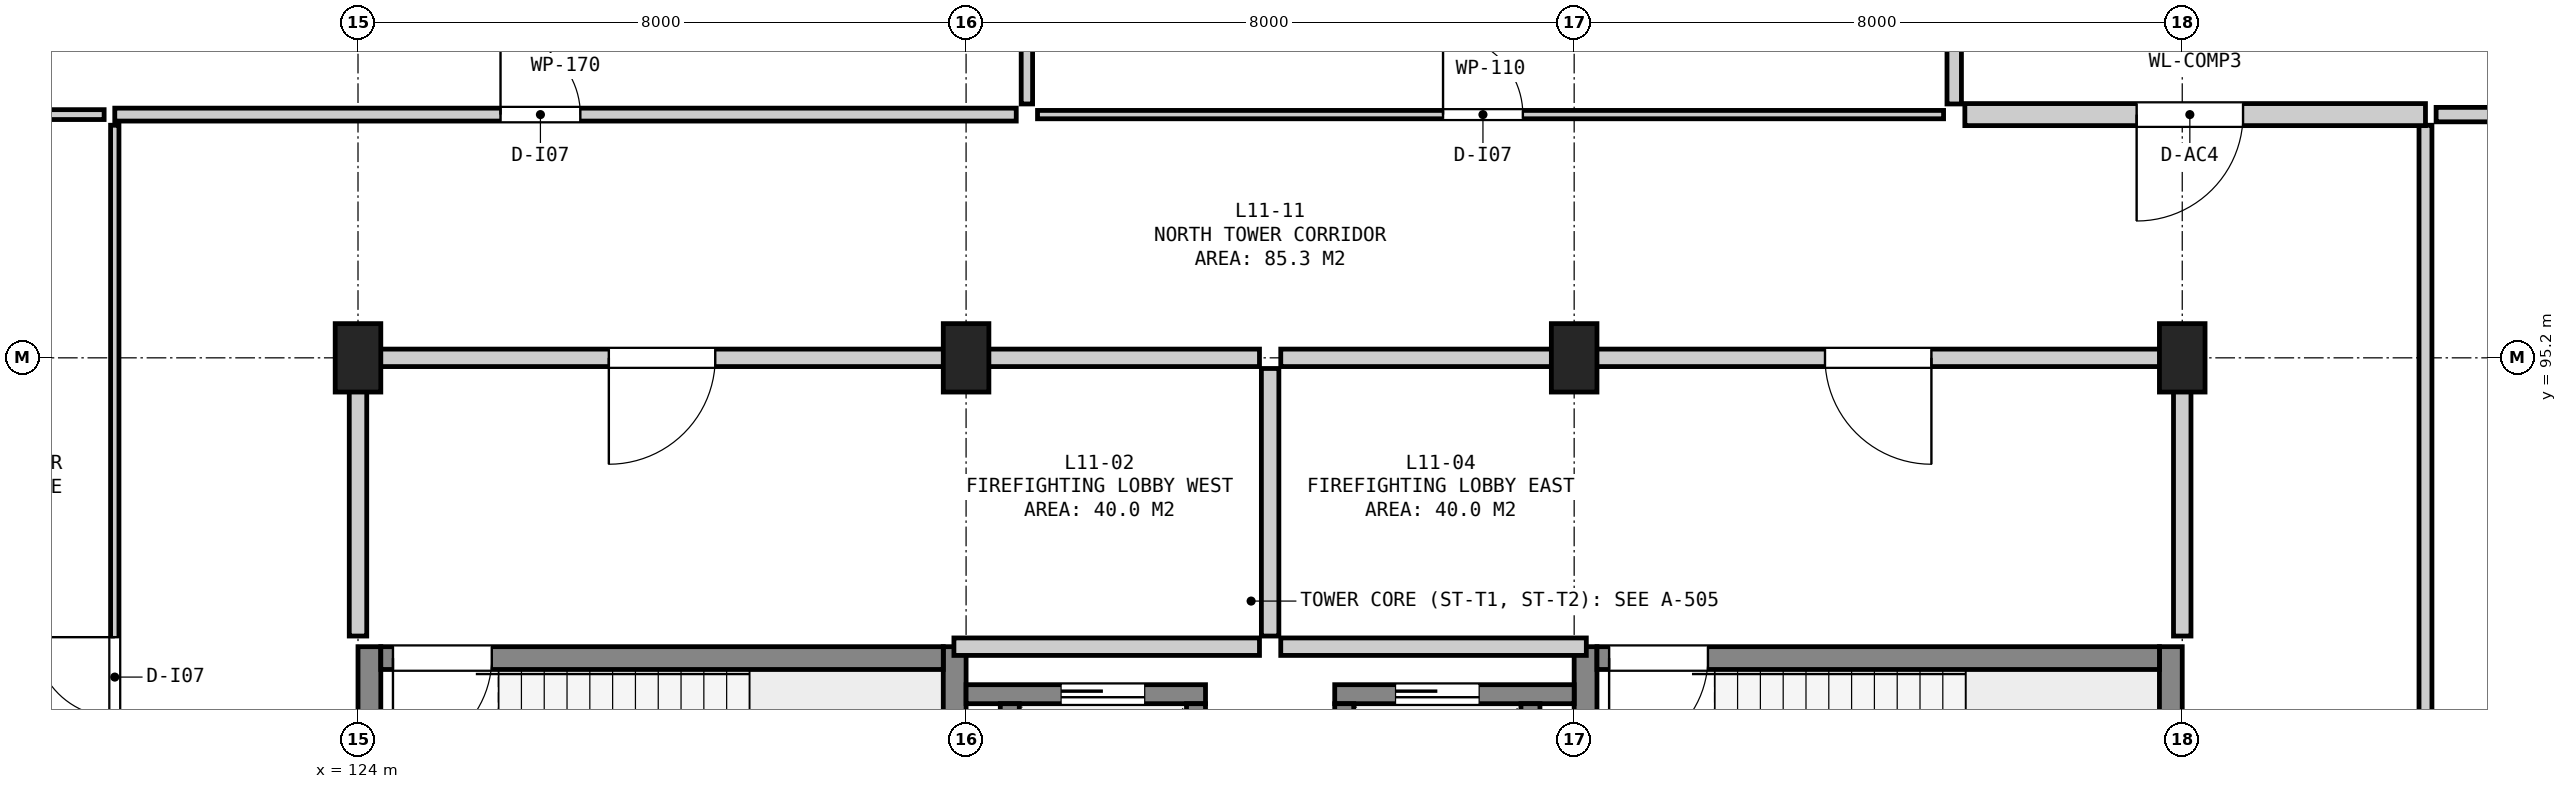
"""IFC4 building model, lengths in metres.
Left out: names, types, materials, properties, quantities, classifications, styles, units other than length and angle.
Written with IfcOpenShell. Run it as: python <this file> out.ifc"""

import sys

from ifc_helpers import new_model, si_unit, direction, frame, frame_2d, origin, origin_2d, place, context, subcontext, project, spatial, rectangle, extrude, element, fill, save


model = new_model("IFC4")
c1 = context("Model", 3, precision=1e-05, world=origin(), true_north=direction((0.0, 1.0)))
c2 = subcontext(c1, "Body", "Model", "MODEL_VIEW")
j1 = project(units=[si_unit("LENGTHUNIT", "METRE"), si_unit("PLANEANGLEUNIT", "RADIAN")], contexts=[c1])
p1 = place(None, origin())
s1 = spatial("IfcSite", under=j1, at=p1, CompositionType="ELEMENT")
p2 = place(p1, origin())
s2 = spatial("IfcBuilding", under=s1, at=p2, CompositionType="ELEMENT")
p3 = place(p2, frame((0.0, 0.0, 47.1)))
s3 = spatial("IfcBuildingStorey", under=s2, at=p3, CompositionType="ELEMENT", Elevation=47.1)
for number, where, z_axis, x_axis in (
    (1, (124.0, 95.2, 0.0), (0.0, 0.0, 1.0), (1.0, 0.0, 0.0)),
    (2, (132.0, 95.2, 0.0), (0.0, 0.0, 1.0), (1.0, 0.0, 0.0)),
    (3, (140.0, 95.2, 0.0), (0.0, 0.0, 1.0), (1.0, 0.0, 0.0)),
    (4, (148.0, 95.2, 0.0), (0.0, 0.0, 1.0), (1.0, 0.0, 0.0)),
):
    element("IfcColumn", number, at=place(p3, frame(where, z_axis=z_axis, x_axis=x_axis)), inside=s3, PredefinedType="COLUMN", context=c2, shape_type="SweptSolid", body=[
        extrude(rectangle(XDim=0.6, YDim=0.9, at=origin_2d()), origin(), (0.0, 0.0, 1.0), 3.8),
    ])
for number, where, z_axis, x_axis in (
    (5, (124.15, 87.2, 0.0), (0.0, 0.0, 1.0), (0.0, 1.0, 0.0)),
    (6, (131.85, 87.2, 0.0), (0.0, 0.0, 1.0), (0.0, 1.0, 0.0)),
):
    element("IfcWall", number, at=place(p3, frame(where, z_axis=z_axis, x_axis=x_axis)), inside=s3, PredefinedType="SHEAR", context=c2, shape_type="SweptSolid", body=[
        extrude(rectangle(XDim=4.2, YDim=0.3, at=frame_2d((2.1, 0.0))), origin(), (0.0, 0.0, 1.0), 3.52),
    ])
p4 = place(p3, frame((124.3, 91.25, 0.0), z_axis=(0.0, 0.0, 1.0), x_axis=(1.0, 0.0, 0.0)))
e7 = element("IfcWall", 7, at=p4, inside=s3, PredefinedType="SHEAR", context=c2, shape_type="SweptSolid", body=[
    extrude(rectangle(XDim=7.4, YDim=0.3, at=frame_2d((3.7, 0.0))), origin(), (0.0, 0.0, 1.0), 3.52),
])
p5 = place(p4, frame((0.16, 0.0, 0.0)))
e8 = element("IfcOpeningElement", 8, at=p5, cuts=e7, PredefinedType="OPENING", context=c2, shape_type="SweptSolid", body=[
    extrude(rectangle(XDim=1.3, YDim=2.18, at=frame_2d((0.65, 1.09))), frame((0.0, 0.162, 0.0), z_axis=(0.0, -1.0, 0.0), x_axis=(1.0, 0.0, 0.0)), (0.0, 0.0, 1.0), 0.324),
])
for number, where, z_axis, x_axis in (
    (9, (140.15, 87.2, 0.0), (0.0, 0.0, 1.0), (0.0, 1.0, 0.0)),
    (10, (147.85, 87.2, 0.0), (0.0, 0.0, 1.0), (0.0, 1.0, 0.0)),
):
    element("IfcWall", number, at=place(p3, frame(where, z_axis=z_axis, x_axis=x_axis)), inside=s3, PredefinedType="SHEAR", context=c2, shape_type="SweptSolid", body=[
        extrude(rectangle(XDim=4.2, YDim=0.3, at=frame_2d((2.1, 0.0))), origin(), (0.0, 0.0, 1.0), 3.52),
    ])
p6 = place(p3, frame((140.3, 91.25, 0.0), z_axis=(0.0, 0.0, 1.0), x_axis=(1.0, 0.0, 0.0)))
e11 = element("IfcWall", 11, at=p6, inside=s3, PredefinedType="SHEAR", context=c2, shape_type="SweptSolid", body=[
    extrude(rectangle(XDim=7.4, YDim=0.3, at=frame_2d((3.7, 0.0))), origin(), (0.0, 0.0, 1.0), 3.52),
])
p7 = place(p6, frame((0.16, 0.0, 0.0)))
e12 = element("IfcOpeningElement", 12, at=p7, cuts=e11, PredefinedType="OPENING", context=c2, shape_type="SweptSolid", body=[
    extrude(rectangle(XDim=1.3, YDim=2.18, at=frame_2d((0.65, 1.09))), frame((0.0, 0.162, 0.0), z_axis=(0.0, -1.0, 0.0), x_axis=(1.0, 0.0, 0.0)), (0.0, 0.0, 1.0), 0.324),
])
p8 = place(p3, frame((132.0, 90.775, 0.0), z_axis=(0.0, 0.0, 1.0), x_axis=(1.0, 0.0, 0.0)))
e13 = element("IfcWall", 13, at=p8, inside=s3, PredefinedType="SHEAR", context=c2, shape_type="SweptSolid", body=[
    extrude(rectangle(XDim=3.15, YDim=0.25, at=frame_2d((1.575, 0.0))), origin(), (0.0, 0.0, 1.0), 3.52),
])
p9 = place(p8, frame((1.25, 0.0, 0.0)))
e14 = element("IfcOpeningElement", 14, at=p9, cuts=e13, PredefinedType="OPENING", context=c2, shape_type="SweptSolid", body=[
    extrude(rectangle(XDim=1.1, YDim=2.15, at=frame_2d((0.55, 1.075))), frame((0.0, 0.137, 0.0), z_axis=(0.0, -1.0, 0.0), x_axis=(1.0, 0.0, 0.0)), (0.0, 0.0, 1.0), 0.274),
])
for number, where, z_axis, x_axis in (
    (15, (132.575, 87.75, 0.0), (0.0, 0.0, 1.0), (0.0, 1.0, 0.0)),
    (16, (135.025, 87.75, 0.0), (0.0, 0.0, 1.0), (0.0, 1.0, 0.0)),
):
    element("IfcWall", number, at=place(p3, frame(where, z_axis=z_axis, x_axis=x_axis)), inside=s3, PredefinedType="SHEAR", context=c2, shape_type="SweptSolid", body=[
        extrude(rectangle(XDim=2.9, YDim=0.25, at=frame_2d((1.45, 0.0))), origin(), (0.0, 0.0, 1.0), 3.52),
    ])
p10 = place(p3, frame((136.85, 90.775, 0.0), z_axis=(0.0, 0.0, 1.0), x_axis=(1.0, 0.0, 0.0)))
e17 = element("IfcWall", 17, at=p10, inside=s3, PredefinedType="SHEAR", context=c2, shape_type="SweptSolid", body=[
    extrude(rectangle(XDim=3.15, YDim=0.25, at=frame_2d((1.575, 0.0))), origin(), (0.0, 0.0, 1.0), 3.52),
])
p11 = place(p10, frame((0.8, 0.0, 0.0)))
e18 = element("IfcOpeningElement", 18, at=p11, cuts=e17, PredefinedType="OPENING", context=c2, shape_type="SweptSolid", body=[
    extrude(rectangle(XDim=1.1, YDim=2.15, at=frame_2d((0.55, 1.075))), frame((0.0, 0.137, 0.0), z_axis=(0.0, -1.0, 0.0), x_axis=(1.0, 0.0, 0.0)), (0.0, 0.0, 1.0), 0.274),
])
for number, where, z_axis, x_axis in (
    (19, (136.975, 87.75, 0.0), (0.0, 0.0, 1.0), (0.0, 1.0, 0.0)),
    (20, (139.425, 87.75, 0.0), (0.0, 0.0, 1.0), (0.0, 1.0, 0.0)),
):
    element("IfcWall", number, at=place(p3, frame(where, z_axis=z_axis, x_axis=x_axis)), inside=s3, PredefinedType="SHEAR", context=c2, shape_type="SweptSolid", body=[
        extrude(rectangle(XDim=2.9, YDim=0.25, at=frame_2d((1.45, 0.0))), origin(), (0.0, 0.0, 1.0), 3.52),
    ])
p12 = place(p3, frame((131.84, 91.4, 0.0), z_axis=(0.0, 0.0, 1.0), x_axis=(1.0, 0.0, 0.0)))
e21 = element("IfcWall", 21, at=p12, inside=s3, PredefinedType="SOLIDWALL", context=c2, shape_type="SweptSolid", body=[
    extrude(rectangle(XDim=4.02, YDim=0.23, at=frame_2d((2.01, 0.0))), origin(), (0.0, 0.0, 1.0), 3.52),
])
p13 = place(p3, frame((124.14, 95.2, 0.0), z_axis=(0.0, 0.0, 1.0), x_axis=(1.0, 0.0, 0.0)))
e22 = element("IfcWall", 22, at=p13, inside=s3, PredefinedType="SOLIDWALL", context=c2, shape_type="SweptSolid", body=[
    extrude(rectangle(XDim=11.72, YDim=0.23, at=frame_2d((5.86, 0.0))), origin(), (0.0, 0.0, 1.0), 2.945),
])
p14 = place(p13, frame((3.16, 0.0, 0.0)))
e23 = element("IfcOpeningElement", 23, at=p14, cuts=e22, PredefinedType="OPENING", context=c2, shape_type="SweptSolid", body=[
    extrude(rectangle(XDim=1.4, YDim=2.2, at=frame_2d((0.7, 1.1))), frame((0.0, 0.127, 0.0), z_axis=(0.0, -1.0, 0.0), x_axis=(1.0, 0.0, 0.0)), (0.0, 0.0, 1.0), 0.254),
])
p15 = place(p3, frame((124.0, 91.54, 0.0), z_axis=(0.0, 0.0, 1.0), x_axis=(0.0, 1.0, 0.0)))
e24 = element("IfcWall", 24, at=p15, inside=s3, PredefinedType="SOLIDWALL", context=c2, shape_type="SweptSolid", body=[
    extrude(rectangle(XDim=3.52, YDim=0.23, at=frame_2d((1.76, 0.0))), origin(), (0.0, 0.0, 1.0), 2.995),
])
p16 = place(p3, frame((136.0, 91.54, 0.0), z_axis=(0.0, 0.0, 1.0), x_axis=(0.0, 1.0, 0.0)))
e25 = element("IfcWall", 25, at=p16, inside=s3, PredefinedType="SOLIDWALL", context=c2, shape_type="SweptSolid", body=[
    extrude(rectangle(XDim=3.52, YDim=0.23, at=frame_2d((1.76, 0.0))), origin(), (0.0, 0.0, 1.0), 3.52),
])
p17 = place(p3, frame((136.14, 91.4, 0.0), z_axis=(0.0, 0.0, 1.0), x_axis=(1.0, 0.0, 0.0)))
e26 = element("IfcWall", 26, at=p17, inside=s3, PredefinedType="SOLIDWALL", context=c2, shape_type="SweptSolid", body=[
    extrude(rectangle(XDim=4.02, YDim=0.23, at=frame_2d((2.01, 0.0))), origin(), (0.0, 0.0, 1.0), 3.52),
])
p18 = place(p3, frame((136.14, 95.2, 0.0), z_axis=(0.0, 0.0, 1.0), x_axis=(1.0, 0.0, 0.0)))
e27 = element("IfcWall", 27, at=p18, inside=s3, PredefinedType="SOLIDWALL", context=c2, shape_type="SweptSolid", body=[
    extrude(rectangle(XDim=11.72, YDim=0.23, at=frame_2d((5.86, 0.0))), origin(), (0.0, 0.0, 1.0), 2.995),
])
p19 = place(p18, frame((7.16, 0.0, 0.0)))
e28 = element("IfcOpeningElement", 28, at=p19, cuts=e27, PredefinedType="OPENING", context=c2, shape_type="SweptSolid", body=[
    extrude(rectangle(XDim=1.4, YDim=2.2, at=frame_2d((0.7, 1.1))), frame((0.0, 0.127, 0.0), z_axis=(0.0, -1.0, 0.0), x_axis=(1.0, 0.0, 0.0)), (0.0, 0.0, 1.0), 0.254),
])
p20 = place(p3, frame((148.0, 91.54, 0.0), z_axis=(0.0, 0.0, 1.0), x_axis=(0.0, 1.0, 0.0)))
e29 = element("IfcWall", 29, at=p20, inside=s3, PredefinedType="SOLIDWALL", context=c2, shape_type="SweptSolid", body=[
    extrude(rectangle(XDim=3.52, YDim=0.23, at=frame_2d((1.76, 0.0))), origin(), (0.0, 0.0, 1.0), 2.895),
])
p21 = place(p3, frame((151.34, 98.4, 0.0), z_axis=(0.0, 0.0, 1.0), x_axis=(1.0, 0.0, 0.0)))
e30 = element("IfcWall", 30, at=p21, inside=s3, PredefinedType="PARTITIONING", context=c2, shape_type="SweptSolid", body=[
    extrude(rectangle(XDim=16.565, YDim=0.19, at=frame_2d((8.282, 0.0))), origin(), (0.0, 0.0, 1.0), 3.52),
])
p22 = place(p3, frame((151.2, 76.14, 0.0), z_axis=(0.0, 0.0, 1.0), x_axis=(0.0, 1.0, 0.0)))
e31 = element("IfcWall", 31, at=p22, inside=s3, PredefinedType="PARTITIONING", context=c2, shape_type="SweptSolid", body=[
    extrude(rectangle(XDim=22.12, YDim=0.17, at=frame_2d((11.06, 0.0))), origin(), (0.0, 0.0, 1.0), 3.52),
])
p23 = place(p22, frame((10.535, 0.0, 0.0)))
e32 = element("IfcOpeningElement", 32, at=p23, cuts=e31, PredefinedType="OPENING", context=c2, shape_type="SweptSolid", body=[
    extrude(rectangle(XDim=1.05, YDim=2.15, at=frame_2d((0.525, 1.075))), frame((0.0, 0.097, 0.0), z_axis=(0.0, -1.0, 0.0), x_axis=(1.0, 0.0, 0.0)), (0.0, 0.0, 1.0), 0.194),
])
p24 = place(p3, frame((116.895, 98.4, 0.0), z_axis=(0.0, 0.0, 1.0), x_axis=(1.0, 0.0, 0.0)))
e33 = element("IfcWall", 33, at=p24, inside=s3, PredefinedType="PARTITIONING", context=c2, shape_type="SweptSolid", body=[
    extrude(rectangle(XDim=3.765, YDim=0.13, at=frame_2d((1.882, 0.0))), origin(), (0.0, 0.0, 1.0), 3.52),
])
p25 = place(p3, frame((120.8, 72.095, 0.0), z_axis=(0.0, 0.0, 1.0), x_axis=(0.0, 1.0, 0.0)))
e34 = element("IfcWall", 34, at=p25, inside=s3, PredefinedType="PARTITIONING", context=c2, shape_type="SweptSolid", body=[
    extrude(rectangle(XDim=26.165, YDim=0.11, at=frame_2d((13.083, 0.0))), origin(), (0.0, 0.0, 1.0), 3.52),
])
p26 = place(p25, frame((18.38, 0.0, 0.0)))
e35 = element("IfcOpeningElement", 35, at=p26, cuts=e34, PredefinedType="OPENING", context=c2, shape_type="SweptSolid", body=[
    extrude(rectangle(XDim=1.05, YDim=2.15, at=frame_2d((0.525, 1.075))), frame((0.0, 0.067, 0.0), z_axis=(0.0, -1.0, 0.0), x_axis=(1.0, 0.0, 0.0)), (0.0, 0.0, 1.0), 0.134),
])
p27 = place(p3, frame((120.8, 98.4, 0.0), z_axis=(0.0, 0.0, 1.0), x_axis=(1.0, 0.0, 0.0)))
e36 = element("IfcWall", 36, at=p27, inside=s3, PredefinedType="PARTITIONING", context=c2, shape_type="SweptSolid", body=[
    extrude(rectangle(XDim=11.86, YDim=0.17, at=frame_2d((5.93, 0.0))), origin(), (0.0, 0.0, 1.0), 3.52),
])
p28 = place(p27, frame((5.075, 0.0, 0.0)))
e37 = element("IfcOpeningElement", 37, at=p28, cuts=e36, PredefinedType="OPENING", context=c2, shape_type="SweptSolid", body=[
    extrude(rectangle(XDim=1.05, YDim=2.15, at=frame_2d((0.525, 1.075))), frame((0.0, 0.097, 0.0), z_axis=(0.0, -1.0, 0.0), x_axis=(1.0, 0.0, 0.0)), (0.0, 0.0, 1.0), 0.194),
])
p29 = place(p3, frame((132.8, 98.54, 0.0), z_axis=(0.0, 0.0, 1.0), x_axis=(0.0, 1.0, 0.0)))
e38 = element("IfcWall", 38, at=p29, inside=s3, PredefinedType="PARTITIONING", context=c2, shape_type="SweptSolid", body=[
    extrude(rectangle(XDim=16.485, YDim=0.15, at=frame_2d((8.242, 0.0))), origin(), (0.0, 0.0, 1.0), 3.52),
])
p30 = place(p3, frame((132.94, 98.4, 0.0), z_axis=(0.0, 0.0, 1.0), x_axis=(1.0, 0.0, 0.0)))
e39 = element("IfcWall", 39, at=p30, inside=s3, PredefinedType="PARTITIONING", context=c2, shape_type="SweptSolid", body=[
    extrude(rectangle(XDim=11.92, YDim=0.11, at=frame_2d((5.96, 0.0))), origin(), (0.0, 0.0, 1.0), 3.52),
])
p31 = place(p30, frame((5.335, 0.0, 0.0)))
e40 = element("IfcOpeningElement", 40, at=p31, cuts=e39, PredefinedType="OPENING", context=c2, shape_type="SweptSolid", body=[
    extrude(rectangle(XDim=1.05, YDim=2.15, at=frame_2d((0.525, 1.075))), frame((0.0, 0.067, 0.0), z_axis=(0.0, -1.0, 0.0), x_axis=(1.0, 0.0, 0.0)), (0.0, 0.0, 1.0), 0.134),
])
p32 = place(p3, frame((145.0, 98.54, 0.0), z_axis=(0.0, 0.0, 1.0), x_axis=(0.0, 1.0, 0.0)))
e41 = element("IfcWall", 41, at=p32, inside=s3, PredefinedType="PARTITIONING", context=c2, shape_type="SweptSolid", body=[
    extrude(rectangle(XDim=16.565, YDim=0.19, at=frame_2d((8.282, 0.0))), origin(), (0.0, 0.0, 1.0), 3.52),
])
p33 = place(p3, frame((145.14, 98.4, 0.0), z_axis=(0.0, 0.0, 1.0), x_axis=(1.0, 0.0, 0.0)))
e42 = element("IfcWall", 42, at=p33, inside=s3, PredefinedType="SOLIDWALL", context=c2, shape_type="SweptSolid", body=[
    extrude(rectangle(XDim=6.06, YDim=0.29, at=frame_2d((3.03, 0.0))), origin(), (0.0, 0.0, 1.0), 3.52),
])
p34 = place(p33, frame((2.26, 0.0, 0.0)))
e43 = element("IfcOpeningElement", 43, at=p34, cuts=e42, PredefinedType="OPENING", context=c2, shape_type="SweptSolid", body=[
    extrude(rectangle(XDim=1.4, YDim=2.2, at=frame_2d((0.7, 1.1))), frame((0.0, 0.157, 0.0), z_axis=(0.0, -1.0, 0.0), x_axis=(1.0, 0.0, 0.0)), (0.0, 0.0, 1.0), 0.314),
])
p35 = place(p5, frame((1.3, 0.0, 0.0), z_axis=(0.0, 0.0, 1.0), x_axis=(-1.0, 0.0, 0.0)))
e44 = element("IfcDoor", 44, at=p35, inside=s3, OperationType="SINGLE_SWING_RIGHT", PredefinedType="DOOR", context=c2, shape_type="SweptSolid", body=[
    extrude(rectangle(XDim=1.3, YDim=2.18, at=frame_2d((0.65, 1.09))), frame((0.0, 0.025, 0.0), z_axis=(0.0, -1.0, 0.0), x_axis=(1.0, 0.0, 0.0)), (0.0, 0.0, 1.0), 0.05),
])
fill(e8, e44)
p36 = place(p7, frame((1.3, 0.0, 0.0), z_axis=(0.0, 0.0, 1.0), x_axis=(-1.0, 0.0, 0.0)))
e45 = element("IfcDoor", 45, at=p36, inside=s3, OperationType="SINGLE_SWING_RIGHT", PredefinedType="DOOR", context=c2, shape_type="SweptSolid", body=[
    extrude(rectangle(XDim=1.3, YDim=2.18, at=frame_2d((0.65, 1.09))), frame((0.0, 0.025, 0.0), z_axis=(0.0, -1.0, 0.0), x_axis=(1.0, 0.0, 0.0)), (0.0, 0.0, 1.0), 0.05),
])
fill(e12, e45)
p37 = place(p9, origin())
e46 = element("IfcDoor", 46, at=p37, inside=s3, OperationType="SLIDING_TO_LEFT", PredefinedType="DOOR", context=c2, shape_type="SweptSolid", body=[
    extrude(rectangle(XDim=1.1, YDim=2.15, at=frame_2d((0.55, 1.075))), frame((0.0, 0.025, 0.0), z_axis=(0.0, -1.0, 0.0), x_axis=(1.0, 0.0, 0.0)), (0.0, 0.0, 1.0), 0.05),
])
fill(e14, e46)
p38 = place(p11, origin())
e47 = element("IfcDoor", 47, at=p38, inside=s3, OperationType="SLIDING_TO_LEFT", PredefinedType="DOOR", context=c2, shape_type="SweptSolid", body=[
    extrude(rectangle(XDim=1.1, YDim=2.15, at=frame_2d((0.55, 1.075))), frame((0.0, 0.025, 0.0), z_axis=(0.0, -1.0, 0.0), x_axis=(1.0, 0.0, 0.0)), (0.0, 0.0, 1.0), 0.05),
])
fill(e18, e47)
p39 = place(p14, frame((1.4, 0.0, 0.0), z_axis=(0.0, 0.0, 1.0), x_axis=(-1.0, 0.0, 0.0)))
e48 = element("IfcDoor", 48, at=p39, inside=s3, OperationType="SINGLE_SWING_RIGHT", PredefinedType="DOOR", context=c2, shape_type="SweptSolid", body=[
    extrude(rectangle(XDim=1.4, YDim=2.2, at=frame_2d((0.7, 1.1))), frame((0.0, 0.025, 0.0), z_axis=(0.0, -1.0, 0.0), x_axis=(1.0, 0.0, 0.0)), (0.0, 0.0, 1.0), 0.05),
])
fill(e23, e48)
p40 = place(p19, frame((1.4, 0.0, 0.0), z_axis=(0.0, 0.0, 1.0), x_axis=(-1.0, 0.0, 0.0)))
e49 = element("IfcDoor", 49, at=p40, inside=s3, OperationType="SINGLE_SWING_LEFT", PredefinedType="DOOR", context=c2, shape_type="SweptSolid", body=[
    extrude(rectangle(XDim=1.4, YDim=2.2, at=frame_2d((0.7, 1.1))), frame((0.0, 0.025, 0.0), z_axis=(0.0, -1.0, 0.0), x_axis=(1.0, 0.0, 0.0)), (0.0, 0.0, 1.0), 0.05),
])
fill(e28, e49)
p41 = place(p26, origin())
e50 = element("IfcDoor", 50, at=p41, inside=s3, OperationType="SINGLE_SWING_RIGHT", PredefinedType="DOOR", context=c2, shape_type="SweptSolid", body=[
    extrude(rectangle(XDim=1.05, YDim=2.15, at=frame_2d((0.525, 1.075))), frame((0.0, 0.025, 0.0), z_axis=(0.0, -1.0, 0.0), x_axis=(1.0, 0.0, 0.0)), (0.0, 0.0, 1.0), 0.05),
])
fill(e35, e50)
p42 = place(p28, origin())
e51 = element("IfcDoor", 51, at=p42, inside=s3, OperationType="SINGLE_SWING_LEFT", PredefinedType="DOOR", context=c2, shape_type="SweptSolid", body=[
    extrude(rectangle(XDim=1.05, YDim=2.15, at=frame_2d((0.525, 1.075))), frame((0.0, 0.025, 0.0), z_axis=(0.0, -1.0, 0.0), x_axis=(1.0, 0.0, 0.0)), (0.0, 0.0, 1.0), 0.05),
])
fill(e37, e51)
p43 = place(p31, origin())
e52 = element("IfcDoor", 52, at=p43, inside=s3, OperationType="SINGLE_SWING_LEFT", PredefinedType="DOOR", context=c2, shape_type="SweptSolid", body=[
    extrude(rectangle(XDim=1.05, YDim=2.15, at=frame_2d((0.525, 1.075))), frame((0.0, 0.025, 0.0), z_axis=(0.0, -1.0, 0.0), x_axis=(1.0, 0.0, 0.0)), (0.0, 0.0, 1.0), 0.05),
])
fill(e40, e52)
p44 = place(p34, frame((1.4, 0.0, 0.0), z_axis=(0.0, 0.0, 1.0), x_axis=(-1.0, 0.0, 0.0)))
e53 = element("IfcDoor", 53, at=p44, inside=s3, OperationType="SINGLE_SWING_RIGHT", PredefinedType="DOOR", context=c2, shape_type="SweptSolid", body=[
    extrude(rectangle(XDim=1.4, YDim=2.2, at=frame_2d((0.7, 1.1))), frame((0.0, 0.025, 0.0), z_axis=(0.0, -1.0, 0.0), x_axis=(1.0, 0.0, 0.0)), (0.0, 0.0, 1.0), 0.05),
])
fill(e43, e53)
save(model, sys.argv[1])
